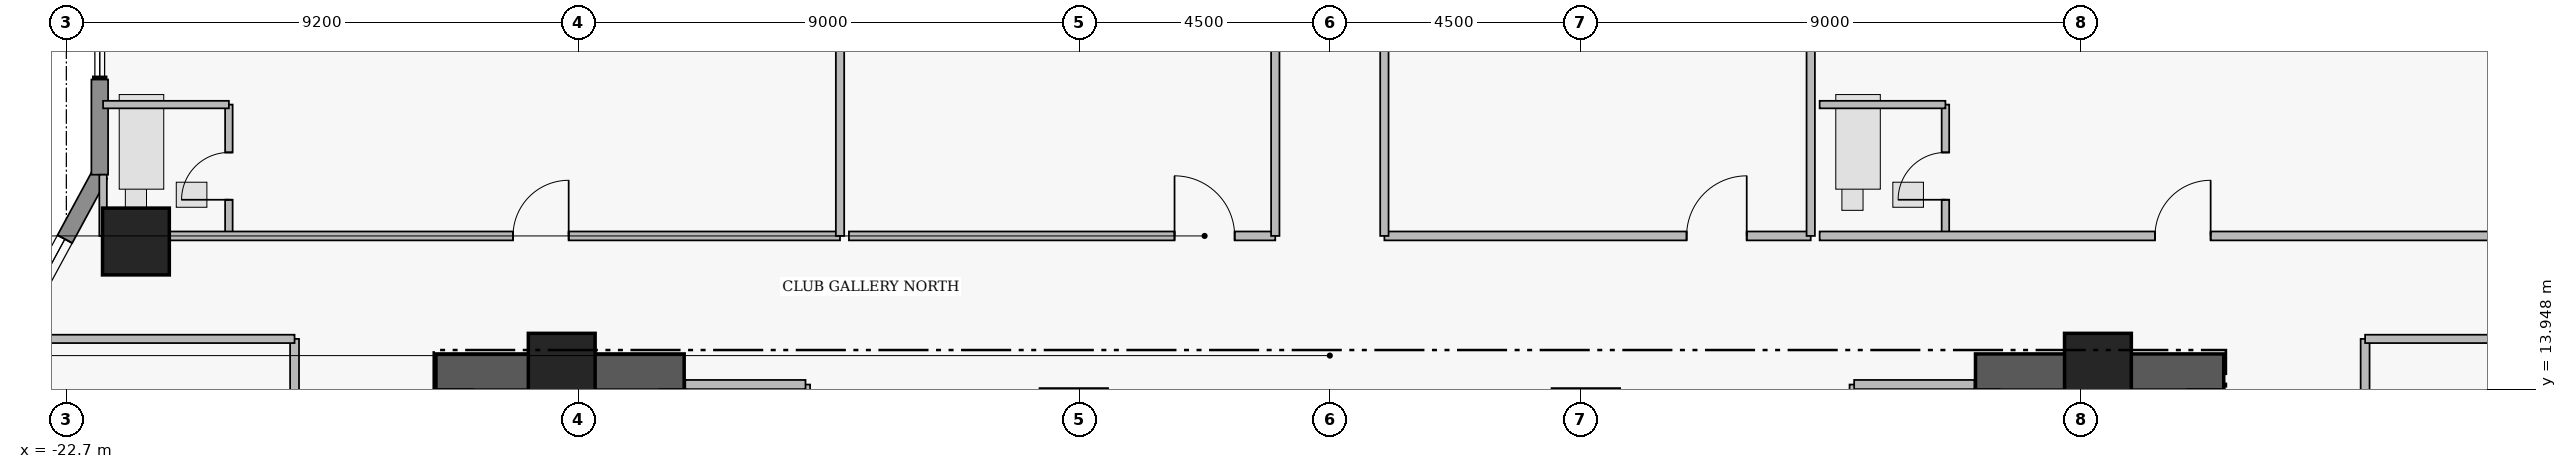
"""IFC4 building model, lengths in metres.
Left out: names, types, materials, properties, quantities, classifications, styles, units other than length and angle.
Written with IfcOpenShell. Run it as: python <this file> out.ifc"""

import sys

from ifc_helpers import new_model, si_unit, direction, frame, frame_2d, origin, origin_2d, place, context, subcontext, project, spatial, rectangle, extrude, element, fill, save


model = new_model("IFC4")
c1 = context("Model", 3, precision=1e-05, world=origin(), true_north=direction((0.0, 1.0)))
c2 = subcontext(c1, "Body", "Model", "MODEL_VIEW")
j1 = project(units=[si_unit("LENGTHUNIT", "METRE"), si_unit("PLANEANGLEUNIT", "RADIAN")], contexts=[c1])
p1 = place(None, origin())
s1 = spatial("IfcSite", under=j1, at=p1, CompositionType="ELEMENT")
p2 = place(p1, origin())
s2 = spatial("IfcBuilding", under=s1, at=p2, CompositionType="ELEMENT")
p3 = place(p2, frame((0.0, 0.0, 199.9)))
s3 = spatial("IfcBuildingStorey", under=s2, at=p3, CompositionType="ELEMENT", Elevation=199.9)
for number, where, z_axis, x_axis in (
    (1, (-16.06, 14.255, 0.0), (0.0, 0.0, 1.0), (1.0, 0.0, 0.0)),
    (2, (11.6, 14.255, 0.0), (0.0, 0.0, 1.0), (1.0, 0.0, 0.0)),
):
    element("IfcWall", number, at=place(p3, frame(where, z_axis=z_axis, x_axis=x_axis)), inside=s3, PredefinedType="SHEAR", context=c2, shape_type="SweptSolid", body=[
        extrude(rectangle(XDim=4.46, YDim=0.65, at=frame_2d((2.23, 0.0))), origin(), (0.0, 0.0, 1.0), 3.56),
    ])
for number, where, z_axis, x_axis in (
    (3, (-13.8, 14.35, 0.0), (0.0, 0.0, 1.0), (1.0, 0.0, 0.0)),
    (4, (-4.6, 13.35, 0.0), (0.0, 0.0, 1.0), (1.0, 0.0, 0.0)),
    (5, (4.6, 13.35, 0.0), (0.0, 0.0, 1.0), (1.0, 0.0, 0.0)),
    (6, (13.8, 14.35, 0.0), (0.0, 0.0, 1.0), (1.0, 0.0, 0.0)),
    (7, (-21.45, 16.6, 0.0), (0.0, 0.0, 1.0), (1.0, 0.0, 0.0)),
):
    element("IfcColumn", number, at=place(p3, frame(where, z_axis=z_axis, x_axis=x_axis)), inside=s3, PredefinedType="COLUMN", context=c2, shape_type="SweptSolid", body=[
        extrude(rectangle(XDim=1.2, YDim=1.2, at=origin_2d()), origin(), (0.0, 0.0, 1.0), 3.75),
    ])
p4 = place(p3, frame((-24.7, 13.0, 0.0), z_axis=(0.0, 0.0, 1.0), x_axis=(0.476258655584, 0.879305233114, 0.0)))
e8 = element("IfcWall", 8, at=p4, inside=s3, PredefinedType="STANDARD", context=c2, shape_type="SweptSolid", body=[
    extrude(rectangle(XDim=5.459, YDim=0.3, at=frame_2d((2.729, 0.0))), origin(), (0.0, 0.0, 1.0), 3.53),
])
p5 = place(p4, frame((2.993, 0.0, 1.25)))
e9 = element("IfcOpeningElement", 9, at=p5, cuts=e8, PredefinedType="OPENING", context=c2, shape_type="SweptSolid", body=[
    extrude(rectangle(XDim=1.15, YDim=1.55, at=frame_2d((0.575, 0.775))), frame((0.0, 0.16, 0.0), z_axis=(0.0, -1.0, 0.0), x_axis=(1.0, 0.0, 0.0)), (0.0, 0.0, 1.0), 0.32),
])
p6 = place(p3, frame((-22.1, 17.8, 0.0), z_axis=(0.0, 0.0, 1.0), x_axis=(0.0, 1.0, 0.0)))
e10 = element("IfcWall", 10, at=p6, inside=s3, PredefinedType="STANDARD", context=c2, shape_type="SweptSolid", body=[
    extrude(rectangle(XDim=1.71, YDim=0.3, at=frame_2d((0.855, 0.0))), origin(), (0.0, 0.0, 1.0), 3.53),
])
p7 = place(p3, frame((-19.78, 16.7, 0.0), z_axis=(0.0, 0.0, 1.0), x_axis=(0.0, 1.0, 0.0)))
e11 = element("IfcWall", 11, at=p7, inside=s3, PredefinedType="PLUMBINGWALL", context=c2, shape_type="SweptSolid", body=[
    extrude(rectangle(XDim=2.36, YDim=0.135, at=frame_2d((1.18, 0.0))), origin(), (0.0, 0.0, 1.0), 3.53),
])
p8 = place(p7, frame((0.65, 0.0, 0.0)))
e12 = element("IfcOpeningElement", 12, at=p8, cuts=e11, PredefinedType="OPENING", context=c2, shape_type="SweptSolid", body=[
    extrude(rectangle(XDim=0.85, YDim=2.1, at=frame_2d((0.425, 1.05))), frame((0.0, 0.077, 0.0), z_axis=(0.0, -1.0, 0.0), x_axis=(1.0, 0.0, 0.0)), (0.0, 0.0, 1.0), 0.155),
])
p9 = place(p3, frame((-22.04, 16.7, 0.0), z_axis=(0.0, 0.0, 1.0), x_axis=(1.0, 0.0, 0.0)))
e13 = element("IfcWall", 13, at=p9, inside=s3, PredefinedType="PARTITIONING", context=c2, shape_type="SweptSolid", body=[
    extrude(rectangle(XDim=13.24, YDim=0.16, at=frame_2d((6.62, 0.0))), origin(), (0.0, 0.0, 1.0), 3.124),
])
p10 = place(p9, frame((7.365, 0.0, 0.0)))
e14 = element("IfcOpeningElement", 14, at=p10, cuts=e13, PredefinedType="OPENING", context=c2, shape_type="SweptSolid", body=[
    extrude(rectangle(XDim=1.0, YDim=2.15, at=frame_2d((0.5, 1.075))), frame((0.0, 0.09, 0.0), z_axis=(0.0, -1.0, 0.0), x_axis=(1.0, 0.0, 0.0)), (0.0, 0.0, 1.0), 0.18),
])
p11 = place(p3, frame((-8.64, 16.7, 0.0), z_axis=(0.0, 0.0, 1.0), x_axis=(1.0, 0.0, 0.0)))
e15 = element("IfcWall", 15, at=p11, inside=s3, PredefinedType="PARTITIONING", context=c2, shape_type="SweptSolid", body=[
    extrude(rectangle(XDim=7.66, YDim=0.16, at=frame_2d((3.83, 0.0))), origin(), (0.0, 0.0, 1.0), 3.124),
])
p12 = place(p11, frame((5.85, 0.0, 0.0)))
e16 = element("IfcOpeningElement", 16, at=p12, cuts=e15, PredefinedType="OPENING", context=c2, shape_type="SweptSolid", body=[
    extrude(rectangle(XDim=1.08, YDim=2.18, at=frame_2d((0.54, 1.09))), frame((0.0, 0.09, 0.0), z_axis=(0.0, -1.0, 0.0), x_axis=(1.0, 0.0, 0.0)), (0.0, 0.0, 1.0), 0.18),
])
p13 = place(p3, frame((0.98, 16.7, 0.0), z_axis=(0.0, 0.0, 1.0), x_axis=(1.0, 0.0, 0.0)))
e17 = element("IfcWall", 17, at=p13, inside=s3, PredefinedType="PARTITIONING", context=c2, shape_type="SweptSolid", body=[
    extrude(rectangle(XDim=7.66, YDim=0.16, at=frame_2d((3.83, 0.0))), origin(), (0.0, 0.0, 1.0), 3.124),
])
p14 = place(p13, frame((5.43, 0.0, 0.0)))
e18 = element("IfcOpeningElement", 18, at=p14, cuts=e17, PredefinedType="OPENING", context=c2, shape_type="SweptSolid", body=[
    extrude(rectangle(XDim=1.08, YDim=2.18, at=frame_2d((0.54, 1.09))), frame((0.0, 0.09, 0.0), z_axis=(0.0, -1.0, 0.0), x_axis=(1.0, 0.0, 0.0)), (0.0, 0.0, 1.0), 0.18),
])
p15 = place(p3, frame((11.06, 16.7, 0.0), z_axis=(0.0, 0.0, 1.0), x_axis=(0.0, 1.0, 0.0)))
e19 = element("IfcWall", 19, at=p15, inside=s3, PredefinedType="PLUMBINGWALL", context=c2, shape_type="SweptSolid", body=[
    extrude(rectangle(XDim=2.36, YDim=0.135, at=frame_2d((1.18, 0.0))), origin(), (0.0, 0.0, 1.0), 3.53),
])
p16 = place(p15, frame((0.65, 0.0, 0.0)))
e20 = element("IfcOpeningElement", 20, at=p16, cuts=e19, PredefinedType="OPENING", context=c2, shape_type="SweptSolid", body=[
    extrude(rectangle(XDim=0.85, YDim=2.1, at=frame_2d((0.425, 1.05))), frame((0.0, 0.077, 0.0), z_axis=(0.0, -1.0, 0.0), x_axis=(1.0, 0.0, 0.0)), (0.0, 0.0, 1.0), 0.155),
])
p17 = place(p3, frame((8.8, 16.7, 0.0), z_axis=(0.0, 0.0, 1.0), x_axis=(1.0, 0.0, 0.0)))
e21 = element("IfcWall", 21, at=p17, inside=s3, PredefinedType="PARTITIONING", context=c2, shape_type="SweptSolid", body=[
    extrude(rectangle(XDim=13.24, YDim=0.16, at=frame_2d((6.62, 0.0))), origin(), (0.0, 0.0, 1.0), 3.124),
])
p18 = place(p17, frame((6.025, 0.0, 0.0)))
e22 = element("IfcOpeningElement", 22, at=p18, cuts=e21, PredefinedType="OPENING", context=c2, shape_type="SweptSolid", body=[
    extrude(rectangle(XDim=1.0, YDim=2.15, at=frame_2d((0.5, 1.075))), frame((0.0, 0.09, 0.0), z_axis=(0.0, -1.0, 0.0), x_axis=(1.0, 0.0, 0.0)), (0.0, 0.0, 1.0), 0.18),
])
p19 = place(p3, frame((18.6, 10.18, 0.0), z_axis=(0.0, 0.0, 1.0), x_axis=(0.0, 1.0, 0.0)))
e23 = element("IfcWall", 23, at=p19, inside=s3, PredefinedType="PARTITIONING", context=c2, shape_type="SweptSolid", body=[
    extrude(rectangle(XDim=4.67, YDim=0.16, at=frame_2d((2.335, 0.0))), origin(), (0.0, 0.0, 1.0), 3.53),
])
p20 = place(p19, frame((1.875, 0.0, 0.0)))
e24 = element("IfcOpeningElement", 24, at=p20, cuts=e23, PredefinedType="OPENING", context=c2, shape_type="SweptSolid", body=[
    extrude(rectangle(XDim=0.92, YDim=2.12, at=frame_2d((0.46, 1.06))), frame((0.0, 0.09, 0.0), z_axis=(0.0, -1.0, 0.0), x_axis=(1.0, 0.0, 0.0)), (0.0, 0.0, 1.0), 0.18),
])
p21 = place(p3, frame((-18.6, 8.06, 0.0), z_axis=(0.0, 0.0, 1.0), x_axis=(0.0, 1.0, 0.0)))
e25 = element("IfcWall", 25, at=p21, inside=s3, PredefinedType="PARTITIONING", context=c2, shape_type="SweptSolid", body=[
    extrude(rectangle(XDim=6.79, YDim=0.16, at=frame_2d((3.395, 0.0))), origin(), (0.0, 0.0, 1.0), 3.53),
])
p22 = place(p21, frame((2.92, 0.0, 0.0)))
e26 = element("IfcOpeningElement", 26, at=p22, cuts=e25, PredefinedType="OPENING", context=c2, shape_type="SweptSolid", body=[
    extrude(rectangle(XDim=0.95, YDim=2.15, at=frame_2d((0.475, 1.075))), frame((0.0, 0.09, 0.0), z_axis=(0.0, -1.0, 0.0), x_axis=(1.0, 0.0, 0.0)), (0.0, 0.0, 1.0), 0.18),
])
p23 = place(p3, frame((-9.42, 11.07, 0.0), z_axis=(0.0, 0.0, 1.0), x_axis=(0.0, 1.0, 0.0)))
e27 = element("IfcWall", 27, at=p23, inside=s3, PredefinedType="PARTITIONING", context=c2, shape_type="SweptSolid", body=[
    extrude(rectangle(XDim=2.96, YDim=0.165, at=frame_2d((1.48, 0.0))), origin(), (0.0, 0.0, 1.0), 3.53),
])
p24 = place(p3, frame((-11.58, 14.03, 0.0), z_axis=(0.0, 0.0, 1.0), x_axis=(1.0, 0.0, 0.0)))
e28 = element("IfcWall", 28, at=p24, inside=s3, PredefinedType="PARTITIONING", context=c2, shape_type="SweptSolid", body=[
    extrude(rectangle(XDim=2.16, YDim=0.165, at=frame_2d((1.08, 0.0))), origin(), (0.0, 0.0, 1.0), 3.53),
])
p25 = place(p3, frame((9.42, 11.07, 0.0), z_axis=(0.0, 0.0, 1.0), x_axis=(0.0, 1.0, 0.0)))
e29 = element("IfcWall", 29, at=p25, inside=s3, PredefinedType="PARTITIONING", context=c2, shape_type="SweptSolid", body=[
    extrude(rectangle(XDim=2.96, YDim=0.165, at=frame_2d((1.48, 0.0))), origin(), (0.0, 0.0, 1.0), 3.53),
])
p26 = place(p3, frame((9.42, 14.03, 0.0), z_axis=(0.0, 0.0, 1.0), x_axis=(1.0, 0.0, 0.0)))
e30 = element("IfcWall", 30, at=p26, inside=s3, PredefinedType="PARTITIONING", context=c2, shape_type="SweptSolid", body=[
    extrude(rectangle(XDim=2.16, YDim=0.165, at=frame_2d((1.08, 0.0))), origin(), (0.0, 0.0, 1.0), 3.53),
])
p27 = place(p3, frame((-22.04, 19.06, 0.0), z_axis=(0.0, 0.0, 1.0), x_axis=(1.0, 0.0, 0.0)))
e31 = element("IfcWall", 31, at=p27, inside=s3, PredefinedType="PLUMBINGWALL", context=c2, shape_type="SweptSolid", body=[
    extrude(rectangle(XDim=2.26, YDim=0.135, at=frame_2d((1.13, 0.0))), origin(), (0.0, 0.0, 1.0), 3.53),
])
p28 = place(p3, frame((-22.04, 16.7, 0.0), z_axis=(0.0, 0.0, 1.0), x_axis=(0.0, 1.0, 0.0)))
e32 = element("IfcWall", 32, at=p28, inside=s3, PredefinedType="PLUMBINGWALL", context=c2, shape_type="SweptSolid", body=[
    extrude(rectangle(XDim=1.1, YDim=0.135, at=frame_2d((0.55, 0.0))), origin(), (0.0, 0.0, 1.0), 3.53),
])
for number, where, z_axis, x_axis in (
    (33, (-8.8, 16.7, 0.0), (0.0, 0.0, 1.0), (0.0, 1.0, 0.0)),
    (34, (-0.98, 16.7, 0.0), (0.0, 0.0, 1.0), (0.0, 1.0, 0.0)),
    (35, (0.98, 16.7, 0.0), (0.0, 0.0, 1.0), (0.0, 1.0, 0.0)),
    (36, (8.64, 16.7, 0.0), (0.0, 0.0, 1.0), (0.0, 1.0, 0.0)),
):
    element("IfcWall", number, at=place(p3, frame(where, z_axis=z_axis, x_axis=x_axis)), inside=s3, PredefinedType="PARTITIONING", context=c2, shape_type="SweptSolid", body=[
        extrude(rectangle(XDim=8.3, YDim=0.15, at=frame_2d((4.15, 0.0))), origin(), (0.0, 0.0, 1.0), 3.53),
    ])
p29 = place(p3, frame((8.8, 19.06, 0.0), z_axis=(0.0, 0.0, 1.0), x_axis=(1.0, 0.0, 0.0)))
e37 = element("IfcWall", 37, at=p29, inside=s3, PredefinedType="PLUMBINGWALL", context=c2, shape_type="SweptSolid", body=[
    extrude(rectangle(XDim=2.26, YDim=0.135, at=frame_2d((1.13, 0.0))), origin(), (0.0, 0.0, 1.0), 3.124),
])
for number, where, z_axis, x_axis in (
    (38, (18.6, 14.85, 0.0), (0.0, 0.0, 1.0), (1.0, 0.0, 0.0)),
    (39, (-23.638, 14.85, 0.0), (0.0, 0.0, 1.0), (1.0, 0.0, 0.0)),
):
    element("IfcWall", number, at=place(p3, frame(where, z_axis=z_axis, x_axis=x_axis)), inside=s3, PredefinedType="PARTITIONING", context=c2, shape_type="SweptSolid", body=[
        extrude(rectangle(XDim=5.038, YDim=0.15, at=frame_2d((2.519, 0.0))), origin(), (0.0, 0.0, 1.0), 3.53),
    ])
p30 = place(p5, origin())
e40 = element("IfcWindow", 40, at=p30, inside=s3, PartitioningType="SINGLE_PANEL", PredefinedType="WINDOW", context=c2, shape_type="SweptSolid", body=[
    extrude(rectangle(XDim=1.15, YDim=1.55, at=frame_2d((0.575, 0.775))), frame((0.0, 0.03, 0.0), z_axis=(0.0, -1.0, 0.0), x_axis=(1.0, 0.0, 0.0)), (0.0, 0.0, 1.0), 0.06),
])
fill(e9, e40)
p31 = place(p8, origin())
e41 = element("IfcDoor", 41, at=p31, inside=s3, OperationType="SINGLE_SWING_LEFT", PredefinedType="DOOR", context=c2, shape_type="SweptSolid", body=[
    extrude(rectangle(XDim=0.85, YDim=2.1, at=frame_2d((0.425, 1.05))), frame((0.0, 0.025, 0.0), z_axis=(0.0, -1.0, 0.0), x_axis=(1.0, 0.0, 0.0)), (0.0, 0.0, 1.0), 0.05),
])
fill(e12, e41)
p32 = place(p10, origin())
e42 = element("IfcDoor", 42, at=p32, inside=s3, OperationType="SINGLE_SWING_RIGHT", PredefinedType="DOOR", context=c2, shape_type="SweptSolid", body=[
    extrude(rectangle(XDim=1.0, YDim=2.15, at=frame_2d((0.5, 1.075))), frame((0.0, 0.025, 0.0), z_axis=(0.0, -1.0, 0.0), x_axis=(1.0, 0.0, 0.0)), (0.0, 0.0, 1.0), 0.05),
])
fill(e14, e42)
p33 = place(p12, origin())
e43 = element("IfcDoor", 43, at=p33, inside=s3, OperationType="SINGLE_SWING_LEFT", PredefinedType="DOOR", context=c2, shape_type="SweptSolid", body=[
    extrude(rectangle(XDim=1.08, YDim=2.18, at=frame_2d((0.54, 1.09))), frame((0.0, 0.025, 0.0), z_axis=(0.0, -1.0, 0.0), x_axis=(1.0, 0.0, 0.0)), (0.0, 0.0, 1.0), 0.05),
])
fill(e16, e43)
p34 = place(p14, origin())
e44 = element("IfcDoor", 44, at=p34, inside=s3, OperationType="SINGLE_SWING_RIGHT", PredefinedType="DOOR", context=c2, shape_type="SweptSolid", body=[
    extrude(rectangle(XDim=1.08, YDim=2.18, at=frame_2d((0.54, 1.09))), frame((0.0, 0.025, 0.0), z_axis=(0.0, -1.0, 0.0), x_axis=(1.0, 0.0, 0.0)), (0.0, 0.0, 1.0), 0.05),
])
fill(e18, e44)
p35 = place(p16, origin())
e45 = element("IfcDoor", 45, at=p35, inside=s3, OperationType="SINGLE_SWING_LEFT", PredefinedType="DOOR", context=c2, shape_type="SweptSolid", body=[
    extrude(rectangle(XDim=0.85, YDim=2.1, at=frame_2d((0.425, 1.05))), frame((0.0, 0.025, 0.0), z_axis=(0.0, -1.0, 0.0), x_axis=(1.0, 0.0, 0.0)), (0.0, 0.0, 1.0), 0.05),
])
fill(e20, e45)
p36 = place(p18, origin())
e46 = element("IfcDoor", 46, at=p36, inside=s3, OperationType="SINGLE_SWING_RIGHT", PredefinedType="DOOR", context=c2, shape_type="SweptSolid", body=[
    extrude(rectangle(XDim=1.0, YDim=2.15, at=frame_2d((0.5, 1.075))), frame((0.0, 0.025, 0.0), z_axis=(0.0, -1.0, 0.0), x_axis=(1.0, 0.0, 0.0)), (0.0, 0.0, 1.0), 0.05),
])
fill(e22, e46)
save(model, sys.argv[1])
